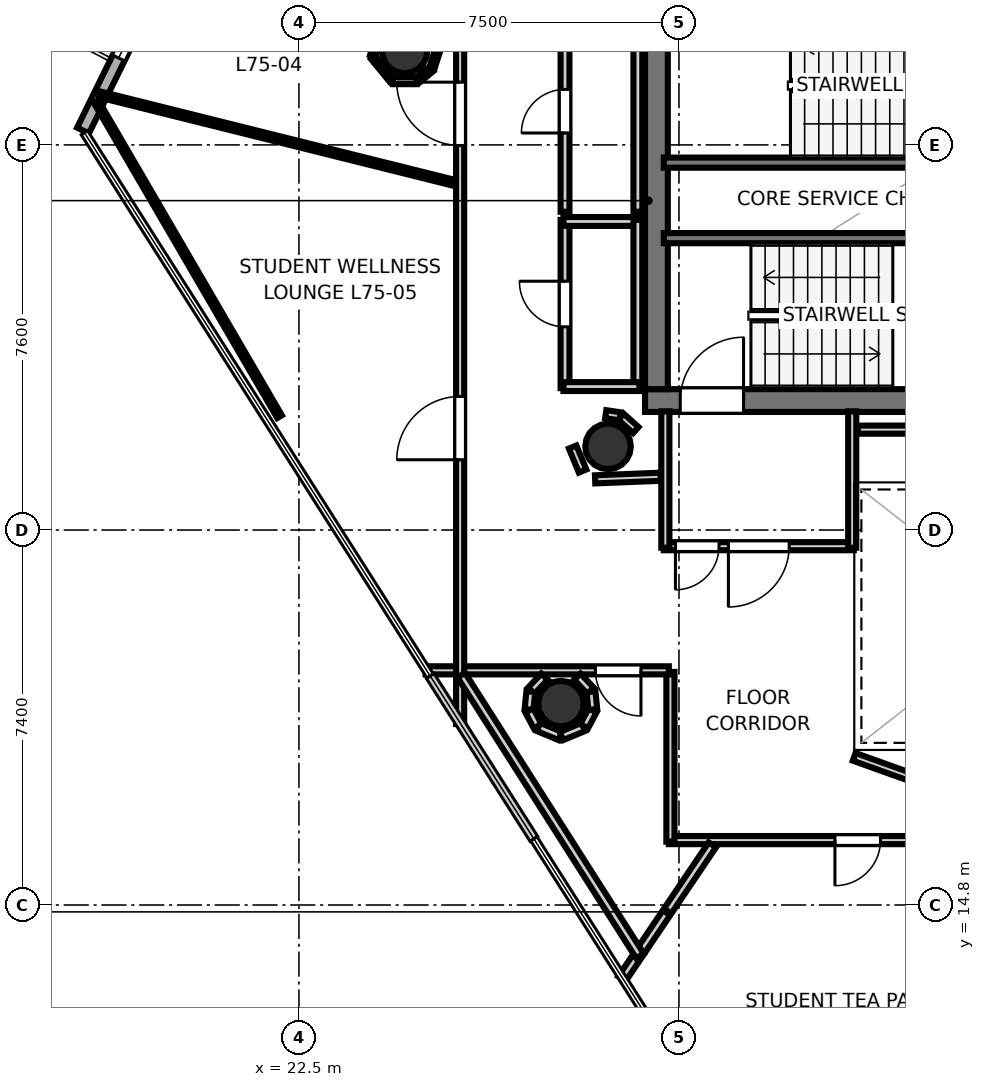
"""IFC4 building model, lengths in metres.
Left out: names, types, materials, properties, quantities, classifications, styles, units other than length and angle.
Written with IfcOpenShell. Run it as: python <this file> out.ifc"""

import sys

from ifc_helpers import new_model, si_unit, direction, frame, frame_2d, origin, origin_2d, place, context, subcontext, project, spatial, rectangle, hollow_circle, extrude, element, fill, save


model = new_model("IFC4")
c1 = context("Model", 3, precision=1e-05, world=origin(), true_north=direction((0.0, 1.0)))
c2 = subcontext(c1, "Body", "Model", "MODEL_VIEW")
j1 = project(units=[si_unit("LENGTHUNIT", "METRE"), si_unit("PLANEANGLEUNIT", "RADIAN")], contexts=[c1])
p1 = place(None, origin())
s1 = spatial("IfcSite", under=j1, at=p1, CompositionType="ELEMENT")
p2 = place(p1, origin())
s2 = spatial("IfcBuilding", under=s1, at=p2, CompositionType="ELEMENT")
p3 = place(p2, frame((0.0, 0.0, 291.7)))
s3 = spatial("IfcBuildingStorey", under=s2, at=p3, CompositionType="ELEMENT", Elevation=291.7)
p4 = place(p3, frame((29.33, 24.755, 0.0), z_axis=(0.0, 0.0, 1.0), x_axis=(1.0, 0.0, 0.0)))
e1 = element("IfcWall", 1, at=p4, inside=s3, PredefinedType="SHEAR", context=c2, shape_type="SweptSolid", body=[
    extrude(rectangle(XDim=10.52, YDim=0.45, at=frame_2d((5.26, 0.0))), origin(), (0.0, 0.0, 1.0), 3.52),
])
p5 = place(p4, frame((0.695, 0.0, 0.0)))
e2 = element("IfcOpeningElement", 2, at=p5, cuts=e1, PredefinedType="OPENING", context=c2, shape_type="SweptSolid", body=[
    extrude(rectangle(XDim=1.25, YDim=2.15, at=frame_2d((0.625, 1.075))), frame((0.0, 0.235, 0.0), z_axis=(0.0, -1.0, 0.0), x_axis=(1.0, 0.0, 0.0)), (0.0, 0.0, 1.0), 0.47),
])
p6 = place(p3, frame((29.555, 24.98, 0.0), z_axis=(0.0, 0.0, 1.0), x_axis=(0.0, 1.0, 0.0)))
e3 = element("IfcWall", 3, at=p6, inside=s3, PredefinedType="SHEAR", context=c2, shape_type="SweptSolid", body=[
    extrude(rectangle(XDim=7.44, YDim=0.45, at=frame_2d((3.72, 0.0))), origin(), (0.0, 0.0, 1.0), 3.52),
])
for number, where, z_axis, x_axis in (
    (4, (28.6, 23.85, 0.0), (0.0, 0.0, 1.0), (1.0, 0.0, 0.0)),
    (5, (24.587, 31.663, 0.0), (0.0, 0.0, 1.0), (1.0, 0.0, 0.0)),
    (6, (27.67, 18.774, 0.0), (0.0, 0.0, 1.0), (1.0, 0.0, 0.0)),
):
    element("IfcColumn", number, at=place(p3, frame(where, z_axis=z_axis, x_axis=x_axis)), inside=s3, PredefinedType="COLUMN", context=c2, shape_type="SweptSolid", body=[
        extrude(hollow_circle(Radius=0.45, WallThickness=0.025, at=origin_2d()), origin(), (0.0, 0.0, 1.0), 3.7),
    ])
p7 = place(p3, frame((20.436, 34.563, 0.0), z_axis=(0.0, 0.0, 1.0), x_axis=(-0.440488239438, -0.897758381145, 0.0)))
e7 = element("IfcWall", 7, at=p7, inside=s3, PredefinedType="SOLIDWALL", context=c2, shape_type="SweptSolid", body=[
    extrude(rectangle(XDim=4.99, YDim=0.26, at=frame_2d((2.495, 0.0))), origin(), (0.0, 0.0, 1.0), 3.52),
])
p8 = place(p7, frame((1.595, 0.0, 0.85)))
e8 = element("IfcOpeningElement", 8, at=p8, cuts=e7, PredefinedType="OPENING", context=c2, shape_type="SweptSolid", body=[
    extrude(rectangle(XDim=1.8, YDim=2.1, at=frame_2d((0.9, 1.05))), frame((0.0, 0.14, 0.0), z_axis=(0.0, -1.0, 0.0), x_axis=(1.0, 0.0, 0.0)), (0.0, 0.0, 1.0), 0.28),
])
p9 = place(p3, frame((29.7, 29.45, 0.0), z_axis=(0.0, 0.0, 1.0), x_axis=(1.0, 0.0, 0.0)))
e9 = element("IfcWall", 9, at=p9, inside=s3, PredefinedType="SOLIDWALL", context=c2, shape_type="SweptSolid", body=[
    extrude(rectangle(XDim=8.3, YDim=0.2, at=frame_2d((4.15, 0.0))), origin(), (0.0, 0.0, 1.0), 3.52),
])
p10 = place(p3, frame((29.7, 27.96, 0.0), z_axis=(0.0, 0.0, 1.0), x_axis=(1.0, 0.0, 0.0)))
e10 = element("IfcWall", 10, at=p10, inside=s3, PredefinedType="SOLIDWALL", context=c2, shape_type="SweptSolid", body=[
    extrude(rectangle(XDim=7.75, YDim=0.2, at=frame_2d((3.875, 0.0))), origin(), (0.0, 0.0, 1.0), 3.52),
])
p11 = place(p3, frame((33.45, 21.881, 0.0), z_axis=(0.0, 0.0, 1.0), x_axis=(-1.0, 0.0, 0.0)))
e11 = element("IfcWall", 11, at=p11, inside=s3, PredefinedType="PARTITIONING", context=c2, shape_type="SweptSolid", body=[
    extrude(rectangle(XDim=3.75, YDim=0.16, at=frame_2d((1.875, 0.0))), origin(), (0.0, 0.0, 1.0), 2.84),
])
p12 = place(p11, frame((1.275, 0.0, 0.0)))
e12 = element("IfcOpeningElement", 12, at=p12, cuts=e11, PredefinedType="OPENING", context=c2, shape_type="SweptSolid", body=[
    extrude(rectangle(XDim=1.2, YDim=2.15, at=frame_2d((0.6, 1.075))), frame((0.0, 0.09, 0.0), z_axis=(0.0, -1.0, 0.0), x_axis=(1.0, 0.0, 0.0)), (0.0, 0.0, 1.0), 0.18),
])
p13 = place(p11, frame((2.66, 0.0, 0.0)))
e13 = element("IfcOpeningElement", 13, at=p13, cuts=e11, PredefinedType="OPENING", context=c2, shape_type="SweptSolid", body=[
    extrude(rectangle(XDim=0.86, YDim=2.05, at=frame_2d((0.43, 1.025))), frame((0.0, 0.09, 0.0), z_axis=(0.0, -1.0, 0.0), x_axis=(1.0, 0.0, 0.0)), (0.0, 0.0, 1.0), 0.18),
])
for number, where, z_axis, x_axis in (
    (14, (29.731, 21.85, 0.0), (0.0, 0.0, 1.0), (0.0, 1.0, 0.0)),
    (15, (33.419, 24.542, 0.0), (0.0, 0.0, 1.0), (0.0, -1.0, 0.0)),
):
    element("IfcWall", number, at=place(p3, frame(where, z_axis=z_axis, x_axis=x_axis)), inside=s3, PredefinedType="PARTITIONING", context=c2, shape_type="SweptSolid", body=[
        extrude(rectangle(XDim=2.692, YDim=0.16, at=frame_2d((1.346, 0.0))), origin(), (0.0, 0.0, 1.0), 2.84),
    ])
p14 = place(p3, frame((27.751, 25.0, 0.0), z_axis=(0.0, 0.0, 1.0), x_axis=(0.0, 1.0, 0.0)))
e16 = element("IfcWall", 16, at=p14, inside=s3, PredefinedType="PLUMBINGWALL", context=c2, shape_type="SweptSolid", body=[
    extrude(rectangle(XDim=3.32, YDim=0.175, at=frame_2d((1.66, 0.0))), origin(), (0.0, 0.0, 1.0), 2.84),
])
p15 = place(p14, frame((1.21, 0.0, 0.0)))
e17 = element("IfcOpeningElement", 17, at=p15, cuts=e16, PredefinedType="OPENING", context=c2, shape_type="SweptSolid", body=[
    extrude(rectangle(XDim=0.9, YDim=2.1, at=frame_2d((0.45, 1.05))), frame((0.0, 0.097, 0.0), z_axis=(0.0, -1.0, 0.0), x_axis=(1.0, 0.0, 0.0)), (0.0, 0.0, 1.0), 0.195),
])
p16 = place(p3, frame((27.72, 28.289, 0.0), z_axis=(0.0, 0.0, 1.0), x_axis=(1.0, 0.0, 0.0)))
e18 = element("IfcWall", 18, at=p16, inside=s3, PredefinedType="PLUMBINGWALL", context=c2, shape_type="SweptSolid", body=[
    extrude(rectangle(XDim=1.5, YDim=0.175, at=frame_2d((0.75, 0.0))), origin(), (0.0, 0.0, 1.0), 2.84),
])
p17 = place(p3, frame((29.189, 28.32, 0.0), z_axis=(0.0, 0.0, 1.0), x_axis=(0.0, -1.0, 0.0)))
e19 = element("IfcWall", 19, at=p17, inside=s3, PredefinedType="PLUMBINGWALL", context=c2, shape_type="SweptSolid", body=[
    extrude(rectangle(XDim=3.32, YDim=0.175, at=frame_2d((1.66, 0.0))), origin(), (0.0, 0.0, 1.0), 2.84),
])
p18 = place(p3, frame((29.22, 25.031, 0.0), z_axis=(0.0, 0.0, 1.0), x_axis=(-1.0, 0.0, 0.0)))
e20 = element("IfcWall", 20, at=p18, inside=s3, PredefinedType="PLUMBINGWALL", context=c2, shape_type="SweptSolid", body=[
    extrude(rectangle(XDim=1.5, YDim=0.175, at=frame_2d((0.75, 0.0))), origin(), (0.0, 0.0, 1.0), 2.84),
])
p19 = place(p3, frame((27.751, 28.48, 0.0), z_axis=(0.0, 0.0, 1.0), x_axis=(0.0, 1.0, 0.0)))
e21 = element("IfcWall", 21, at=p19, inside=s3, PredefinedType="PLUMBINGWALL", context=c2, shape_type="SweptSolid", body=[
    extrude(rectangle(XDim=3.97, YDim=0.175, at=frame_2d((1.985, 0.0))), origin(), (0.0, 0.0, 1.0), 2.84),
])
p20 = place(p19, frame((1.555, 0.0, 0.0)))
e22 = element("IfcOpeningElement", 22, at=p20, cuts=e21, PredefinedType="OPENING", context=c2, shape_type="SweptSolid", body=[
    extrude(rectangle(XDim=0.86, YDim=2.05, at=frame_2d((0.43, 1.025))), frame((0.0, 0.097, 0.0), z_axis=(0.0, -1.0, 0.0), x_axis=(1.0, 0.0, 0.0)), (0.0, 0.0, 1.0), 0.195),
])
p21 = place(p3, frame((29.189, 32.45, 0.0), z_axis=(0.0, 0.0, 1.0), x_axis=(0.0, -1.0, 0.0)))
e23 = element("IfcWall", 23, at=p21, inside=s3, PredefinedType="PLUMBINGWALL", context=c2, shape_type="SweptSolid", body=[
    extrude(rectangle(XDim=3.97, YDim=0.175, at=frame_2d((1.985, 0.0))), origin(), (0.0, 0.0, 1.0), 2.84),
])
p22 = place(p3, frame((37.872, 24.181, 0.0), z_axis=(0.0, 0.0, 1.0), x_axis=(-1.0, 0.0, 0.0)))
e24 = element("IfcWall", 24, at=p22, inside=s3, PredefinedType="PARTITIONING", context=c2, shape_type="SweptSolid", body=[
    extrude(rectangle(XDim=4.342, YDim=0.16, at=frame_2d((2.171, 0.0))), origin(), (0.0, 0.0, 1.0), 2.84),
])
p23 = place(p3, frame((29.149, 24.173, 0.0), z_axis=(0.0, 0.0, 1.0), x_axis=(-0.745225165416, 0.666812906917, 0.0)))
e25 = element("IfcWall", 25, at=p23, inside=s3, PredefinedType="PARTITIONING", context=c2, shape_type="SweptSolid", body=[
    extrude(rectangle(XDim=0.396, YDim=0.16, at=frame_2d((0.198, 0.0))), origin(), (0.0, 0.0, 1.0), 2.84),
])
p24 = place(p3, frame((28.838, 24.444, 0.0), z_axis=(0.0, 0.0, 1.0), x_axis=(-0.989449148305, 0.144880581578, 0.0)))
e26 = element("IfcWall", 26, at=p24, inside=s3, PredefinedType="PARTITIONING", context=c2, shape_type="SweptSolid", body=[
    extrude(rectangle(XDim=0.286, YDim=0.16, at=frame_2d((0.143, 0.0))), origin(), (0.0, 0.0, 1.0), 2.84),
])
p25 = place(p3, frame((27.901, 23.838, 0.0), z_axis=(0.0, 0.0, 1.0), x_axis=(0.382856448334, -0.923807847969, 0.0)))
e27 = element("IfcWall", 27, at=p25, inside=s3, PredefinedType="PARTITIONING", context=c2, shape_type="SweptSolid", body=[
    extrude(rectangle(XDim=0.513, YDim=0.16, at=frame_2d((0.256, 0.0))), origin(), (0.0, 0.0, 1.0), 2.84),
])
p26 = place(p3, frame((28.345, 23.2, 0.0), z_axis=(0.0, 0.0, 1.0), x_axis=(0.999216536924, 0.039576664043, 0.0)))
e28 = element("IfcWall", 28, at=p26, inside=s3, PredefinedType="PARTITIONING", context=c2, shape_type="SweptSolid", body=[
    extrude(rectangle(XDim=1.295, YDim=0.16, at=frame_2d((0.648, 0.0))), origin(), (0.0, 0.0, 1.0), 2.84),
])
p27 = place(p3, frame((33.458, 17.724, 0.0), z_axis=(0.0, 0.0, 1.0), x_axis=(0.94128854789, -0.337603124408, 0.0)))
e29 = element("IfcWall", 29, at=p27, inside=s3, PredefinedType="PARTITIONING", context=c2, shape_type="SweptSolid", body=[
    extrude(rectangle(XDim=3.54, YDim=0.16, at=frame_2d((1.77, 0.0))), origin(), (0.0, 0.0, 1.0), 2.84),
])
p28 = place(p3, frame((44.046, 16.081, 0.0), z_axis=(0.0, 0.0, 1.0), x_axis=(-1.0, 0.0, 0.0)))
e30 = element("IfcWall", 30, at=p28, inside=s3, PredefinedType="PARTITIONING", context=c2, shape_type="SweptSolid", body=[
    extrude(rectangle(XDim=14.246, YDim=0.16, at=frame_2d((7.123, 0.0))), origin(), (0.0, 0.0, 1.0), 2.84),
])
p29 = place(p28, frame((10.069, 0.0, 0.0)))
e31 = element("IfcOpeningElement", 31, at=p29, cuts=e30, PredefinedType="OPENING", context=c2, shape_type="SweptSolid", body=[
    extrude(rectangle(XDim=0.9, YDim=2.1, at=frame_2d((0.45, 1.05))), frame((0.0, 0.09, 0.0), z_axis=(0.0, -1.0, 0.0), x_axis=(1.0, 0.0, 0.0)), (0.0, 0.0, 1.0), 0.18),
])
p30 = place(p3, frame((29.831, 16.05, 0.0), z_axis=(0.0, 0.0, 1.0), x_axis=(0.0, 1.0, 0.0)))
e32 = element("IfcWall", 32, at=p30, inside=s3, PredefinedType="PARTITIONING", context=c2, shape_type="SweptSolid", body=[
    extrude(rectangle(XDim=3.35, YDim=0.16, at=frame_2d((1.675, 0.0))), origin(), (0.0, 0.0, 1.0), 2.84),
])
p31 = place(p3, frame((29.8, 19.431, 0.0), z_axis=(0.0, 0.0, 1.0), x_axis=(-1.0, 0.0, 0.0)))
e33 = element("IfcWall", 33, at=p31, inside=s3, PredefinedType="PARTITIONING", context=c2, shape_type="SweptSolid", body=[
    extrude(rectangle(XDim=4.801, YDim=0.16, at=frame_2d((2.4, 0.0))), origin(), (0.0, 0.0, 1.0), 2.84),
])
p32 = place(p31, frame((0.55, 0.0, 0.0)))
e34 = element("IfcOpeningElement", 34, at=p32, cuts=e33, PredefinedType="OPENING", context=c2, shape_type="SweptSolid", body=[
    extrude(rectangle(XDim=0.9, YDim=2.1, at=frame_2d((0.45, 1.05))), frame((0.0, 0.09, 0.0), z_axis=(0.0, -1.0, 0.0), x_axis=(1.0, 0.0, 0.0)), (0.0, 0.0, 1.0), 0.18),
])
p33 = place(p3, frame((25.681, 18.372, 0.0), z_axis=(0.0, 0.0, 1.0), x_axis=(0.0, 1.0, 0.0)))
e35 = element("IfcWall", 35, at=p33, inside=s3, PredefinedType="PARTITIONING", context=c2, shape_type="SweptSolid", body=[
    extrude(rectangle(XDim=14.178, YDim=0.16, at=frame_2d((7.089, 0.0))), origin(), (0.0, 0.0, 1.0), 2.84),
])
p34 = place(p33, frame((11.417, 0.0, 0.0)))
e36 = element("IfcOpeningElement", 36, at=p34, cuts=e35, PredefinedType="OPENING", context=c2, shape_type="SweptSolid", body=[
    extrude(rectangle(XDim=1.25, YDim=2.2, at=frame_2d((0.625, 1.1))), frame((0.0, 0.09, 0.0), z_axis=(0.0, -1.0, 0.0), x_axis=(1.0, 0.0, 0.0)), (0.0, 0.0, 1.0), 0.18),
])
p35 = place(p33, frame((5.215, 0.0, 0.0)))
e37 = element("IfcOpeningElement", 37, at=p35, cuts=e35, PredefinedType="OPENING", context=c2, shape_type="SweptSolid", body=[
    extrude(rectangle(XDim=1.25, YDim=2.2, at=frame_2d((0.625, 1.1))), frame((0.0, 0.09, 0.0), z_axis=(0.0, -1.0, 0.0), x_axis=(1.0, 0.0, 0.0)), (0.0, 0.0, 1.0), 0.18),
])
p36 = place(p3, frame((30.658, 15.987, 0.0), z_axis=(0.0, 0.0, 1.0), x_axis=(-0.559194255482, -0.82903666061, 0.0)))
e38 = element("IfcWall", 38, at=p36, inside=s3, PredefinedType="PLUMBINGWALL", context=c2, shape_type="SweptSolid", body=[
    extrude(rectangle(XDim=3.191, YDim=0.175, at=frame_2d((1.596, 0.0))), origin(), (0.0, 0.0, 1.0), 2.84),
])
p37 = place(p3, frame((29.231, 13.794, 0.0), z_axis=(0.0, 0.0, 1.0), x_axis=(-0.5370149386, 0.843572732916, 0.0)))
e39 = element("IfcWall", 39, at=p37, inside=s3, PredefinedType="PLUMBINGWALL", context=c2, shape_type="SweptSolid", body=[
    extrude(rectangle(XDim=6.57, YDim=0.175, at=frame_2d((3.285, 0.0))), origin(), (0.0, 0.0, 1.0), 2.84),
])
p38 = place(p3, frame((27.347, 19.306, 0.0), z_axis=(0.0, 0.0, 1.0), x_axis=(-0.68932010071, -0.724456899171, 0.0)))
e40 = element("IfcWall", 40, at=p38, inside=s3, PredefinedType="PLUMBINGWALL", context=c2, shape_type="SweptSolid", body=[
    extrude(rectangle(XDim=0.382, YDim=0.175, at=frame_2d((0.191, 0.0))), origin(), (0.0, 0.0, 1.0), 2.84),
])
p39 = place(p3, frame((27.076, 19.01, 0.0), z_axis=(0.0, 0.0, 1.0), x_axis=(-0.097865889817, -0.995199611942, 0.0)))
e41 = element("IfcWall", 41, at=p39, inside=s3, PredefinedType="PLUMBINGWALL", context=c2, shape_type="SweptSolid", body=[
    extrude(rectangle(XDim=0.354, YDim=0.175, at=frame_2d((0.177, 0.0))), origin(), (0.0, 0.0, 1.0), 2.84),
])
p40 = place(p3, frame((27.044, 18.64, 0.0), z_axis=(0.0, 0.0, 1.0), x_axis=(0.471053526925, -0.882104628019, 0.0)))
e42 = element("IfcWall", 42, at=p40, inside=s3, PredefinedType="PLUMBINGWALL", context=c2, shape_type="SweptSolid", body=[
    extrude(rectangle(XDim=0.354, YDim=0.175, at=frame_2d((0.177, 0.0))), origin(), (0.0, 0.0, 1.0), 2.84),
])
for number, where, z_axis, x_axis in (
    (43, (27.227, 18.314, 0.0), (0.0, 0.0, 1.0), (0.924, -0.382, 0.0)),
    (44, (27.682, 18.135, 0.0), (0.0, 0.0, 1.0), (0.924, 0.382, 0.0)),
):
    element("IfcWall", number, at=place(p3, frame(where, z_axis=z_axis, x_axis=x_axis)), inside=s3, PredefinedType="PLUMBINGWALL", context=c2, shape_type="SweptSolid", body=[
        extrude(rectangle(XDim=0.467, YDim=0.175, at=frame_2d((0.233, 0.0))), origin(), (0.0, 0.0, 1.0), 2.84),
    ])
p41 = place(p3, frame((28.129, 18.328, 0.0), z_axis=(0.0, 0.0, 1.0), x_axis=(0.471589913721, 0.881817981942, 0.0)))
e45 = element("IfcWall", 45, at=p41, inside=s3, PredefinedType="PLUMBINGWALL", context=c2, shape_type="SweptSolid", body=[
    extrude(rectangle(XDim=0.354, YDim=0.175, at=frame_2d((0.177, 0.0))), origin(), (0.0, 0.0, 1.0), 2.84),
])
p42 = place(p3, frame((28.299, 18.658, 0.0), z_axis=(0.0, 0.0, 1.0), x_axis=(-0.097865889817, 0.995199611942, 0.0)))
e46 = element("IfcWall", 46, at=p42, inside=s3, PredefinedType="PLUMBINGWALL", context=c2, shape_type="SweptSolid", body=[
    extrude(rectangle(XDim=0.354, YDim=0.175, at=frame_2d((0.177, 0.0))), origin(), (0.0, 0.0, 1.0), 2.84),
])
p43 = place(p3, frame((28.256, 19.029, 0.0), z_axis=(0.0, 0.0, 1.0), x_axis=(-0.68932010071, 0.724456899171, 0.0)))
e47 = element("IfcWall", 47, at=p43, inside=s3, PredefinedType="PLUMBINGWALL", context=c2, shape_type="SweptSolid", body=[
    extrude(rectangle(XDim=0.382, YDim=0.175, at=frame_2d((0.191, 0.0))), origin(), (0.0, 0.0, 1.0), 2.84),
])
p44 = place(p3, frame((24.126, 32.103, 0.0), z_axis=(0.0, 0.0, 1.0), x_axis=(-0.290384423064, -0.956910072495, 0.0)))
e48 = element("IfcWall", 48, at=p44, inside=s3, PredefinedType="PARTITIONING", context=c2, shape_type="SweptSolid", body=[
    extrude(rectangle(XDim=0.575, YDim=0.12, at=frame_2d((0.288, 0.0))), origin(), (0.0, 0.0, 1.0), 2.84),
])
p45 = place(p3, frame((23.965, 31.524, 0.0), z_axis=(0.0, 0.0, 1.0), x_axis=(0.634277575631, -0.77310539841, 0.0)))
e49 = element("IfcWall", 49, at=p45, inside=s3, PredefinedType="PARTITIONING", context=c2, shape_type="SweptSolid", body=[
    extrude(rectangle(XDim=0.575, YDim=0.105, at=frame_2d((0.288, 0.0))), origin(), (0.0, 0.0, 1.0), 2.84),
])
p46 = place(p3, frame((24.354, 31.068, 0.0), z_axis=(0.0, 0.0, 1.0), x_axis=(1.0, 0.0, 0.0)))
e50 = element("IfcWall", 50, at=p46, inside=s3, PredefinedType="PARTITIONING", context=c2, shape_type="SweptSolid", body=[
    extrude(rectangle(XDim=0.467, YDim=0.14, at=frame_2d((0.233, 0.0))), origin(), (0.0, 0.0, 1.0), 2.84),
])
p47 = place(p3, frame((24.84, 31.075, 0.0), z_axis=(0.0, 0.0, 1.0), x_axis=(0.773281307259, 0.634063103992, 0.0)))
e51 = element("IfcWall", 51, at=p47, inside=s3, PredefinedType="PARTITIONING", context=c2, shape_type="SweptSolid", body=[
    extrude(rectangle(XDim=0.354, YDim=0.12, at=frame_2d((0.177, 0.0))), origin(), (0.0, 0.0, 1.0), 2.84),
])
p48 = place(p3, frame((25.124, 31.315, 0.0), z_axis=(0.0, 0.0, 1.0), x_axis=(0.306761714687, 0.951786347035, 0.0)))
e52 = element("IfcWall", 52, at=p48, inside=s3, PredefinedType="PARTITIONING", context=c2, shape_type="SweptSolid", body=[
    extrude(rectangle(XDim=0.325, YDim=0.105, at=frame_2d((0.163, 0.0))), origin(), (0.0, 0.0, 1.0), 2.84),
])
p49 = place(p3, frame((25.577, 29.048, 0.0), z_axis=(0.0, 0.0, 1.0), x_axis=(-0.970297325038, 0.241915483226, 0.0)))
e53 = element("IfcWall", 53, at=p49, inside=s3, PredefinedType="PARTITIONING", context=c2, shape_type="SweptSolid", body=[
    extrude(rectangle(XDim=7.226, YDim=0.12, at=frame_2d((3.613, 0.0))), origin(), (0.0, 0.0, 1.0), 2.84),
])
p50 = place(p3, frame((22.117, 24.437, 0.0), z_axis=(0.0, 0.0, 1.0), x_axis=(-0.503024513094, 0.864272144192, 0.0)))
e54 = element("IfcWall", 54, at=p50, inside=s3, PredefinedType="PARTITIONING", context=c2, shape_type="SweptSolid", body=[
    extrude(rectangle(XDim=7.193, YDim=0.105, at=frame_2d((3.596, 0.0))), origin(), (0.0, 0.0, 1.0), 2.84),
])
p51 = place(p5, origin())
e55 = element("IfcDoor", 55, at=p51, inside=s3, OperationType="SINGLE_SWING_RIGHT", PredefinedType="DOOR", context=c2, shape_type="SweptSolid", body=[
    extrude(rectangle(XDim=1.25, YDim=2.15, at=frame_2d((0.625, 1.075))), frame((0.0, 0.025, 0.0), z_axis=(0.0, -1.0, 0.0), x_axis=(1.0, 0.0, 0.0)), (0.0, 0.0, 1.0), 0.05),
])
fill(e2, e55)
p52 = place(p12, origin())
e56 = element("IfcDoor", 56, at=p52, inside=s3, OperationType="SINGLE_SWING_RIGHT", PredefinedType="DOOR", context=c2, shape_type="SweptSolid", body=[
    extrude(rectangle(XDim=1.2, YDim=2.15, at=frame_2d((0.6, 1.075))), frame((0.0, 0.025, 0.0), z_axis=(0.0, -1.0, 0.0), x_axis=(1.0, 0.0, 0.0)), (0.0, 0.0, 1.0), 0.05),
])
fill(e12, e56)
p53 = place(p15, origin())
e57 = element("IfcDoor", 57, at=p53, inside=s3, OperationType="SINGLE_SWING_RIGHT", PredefinedType="DOOR", context=c2, shape_type="SweptSolid", body=[
    extrude(rectangle(XDim=0.9, YDim=2.1, at=frame_2d((0.45, 1.05))), frame((0.0, 0.025, 0.0), z_axis=(0.0, -1.0, 0.0), x_axis=(1.0, 0.0, 0.0)), (0.0, 0.0, 1.0), 0.05),
])
fill(e17, e57)
p54 = place(p20, origin())
e58 = element("IfcDoor", 58, at=p54, inside=s3, OperationType="SINGLE_SWING_LEFT", PredefinedType="DOOR", context=c2, shape_type="SweptSolid", body=[
    extrude(rectangle(XDim=0.86, YDim=2.05, at=frame_2d((0.43, 1.025))), frame((0.0, 0.025, 0.0), z_axis=(0.0, -1.0, 0.0), x_axis=(1.0, 0.0, 0.0)), (0.0, 0.0, 1.0), 0.05),
])
fill(e22, e58)
p55 = place(p13, origin())
e59 = element("IfcDoor", 59, at=p55, inside=s3, OperationType="SINGLE_SWING_RIGHT", PredefinedType="DOOR", context=c2, shape_type="SweptSolid", body=[
    extrude(rectangle(XDim=0.86, YDim=2.05, at=frame_2d((0.43, 1.025))), frame((0.0, 0.025, 0.0), z_axis=(0.0, -1.0, 0.0), x_axis=(1.0, 0.0, 0.0)), (0.0, 0.0, 1.0), 0.05),
])
fill(e13, e59)
p56 = place(p32, origin())
e60 = element("IfcDoor", 60, at=p56, inside=s3, OperationType="SINGLE_SWING_LEFT", PredefinedType="DOOR", context=c2, shape_type="SweptSolid", body=[
    extrude(rectangle(XDim=0.9, YDim=2.1, at=frame_2d((0.45, 1.05))), frame((0.0, 0.025, 0.0), z_axis=(0.0, -1.0, 0.0), x_axis=(1.0, 0.0, 0.0)), (0.0, 0.0, 1.0), 0.05),
])
fill(e34, e60)
p57 = place(p29, origin())
e61 = element("IfcDoor", 61, at=p57, inside=s3, OperationType="SINGLE_SWING_RIGHT", PredefinedType="DOOR", context=c2, shape_type="SweptSolid", body=[
    extrude(rectangle(XDim=0.9, YDim=2.1, at=frame_2d((0.45, 1.05))), frame((0.0, 0.025, 0.0), z_axis=(0.0, -1.0, 0.0), x_axis=(1.0, 0.0, 0.0)), (0.0, 0.0, 1.0), 0.05),
])
fill(e31, e61)
p58 = place(p34, origin())
e62 = element("IfcDoor", 62, at=p58, inside=s3, OperationType="SINGLE_SWING_RIGHT", PredefinedType="DOOR", context=c2, shape_type="SweptSolid", body=[
    extrude(rectangle(XDim=1.25, YDim=2.2, at=frame_2d((0.625, 1.1))), frame((0.0, 0.025, 0.0), z_axis=(0.0, -1.0, 0.0), x_axis=(1.0, 0.0, 0.0)), (0.0, 0.0, 1.0), 0.05),
])
fill(e36, e62)
p59 = place(p35, origin())
e63 = element("IfcDoor", 63, at=p59, inside=s3, OperationType="SINGLE_SWING_LEFT", PredefinedType="DOOR", context=c2, shape_type="SweptSolid", body=[
    extrude(rectangle(XDim=1.25, YDim=2.2, at=frame_2d((0.625, 1.1))), frame((0.0, 0.025, 0.0), z_axis=(0.0, -1.0, 0.0), x_axis=(1.0, 0.0, 0.0)), (0.0, 0.0, 1.0), 0.05),
])
fill(e37, e63)
p60 = place(p8, origin())
e64 = element("IfcWindow", 64, at=p60, inside=s3, PartitioningType="SINGLE_PANEL", PredefinedType="WINDOW", context=c2, shape_type="SweptSolid", body=[
    extrude(rectangle(XDim=1.8, YDim=2.1, at=frame_2d((0.9, 1.05))), frame((0.0, 0.03, 0.0), z_axis=(0.0, -1.0, 0.0), x_axis=(1.0, 0.0, 0.0)), (0.0, 0.0, 1.0), 0.06),
])
fill(e8, e64)
save(model, sys.argv[1])
